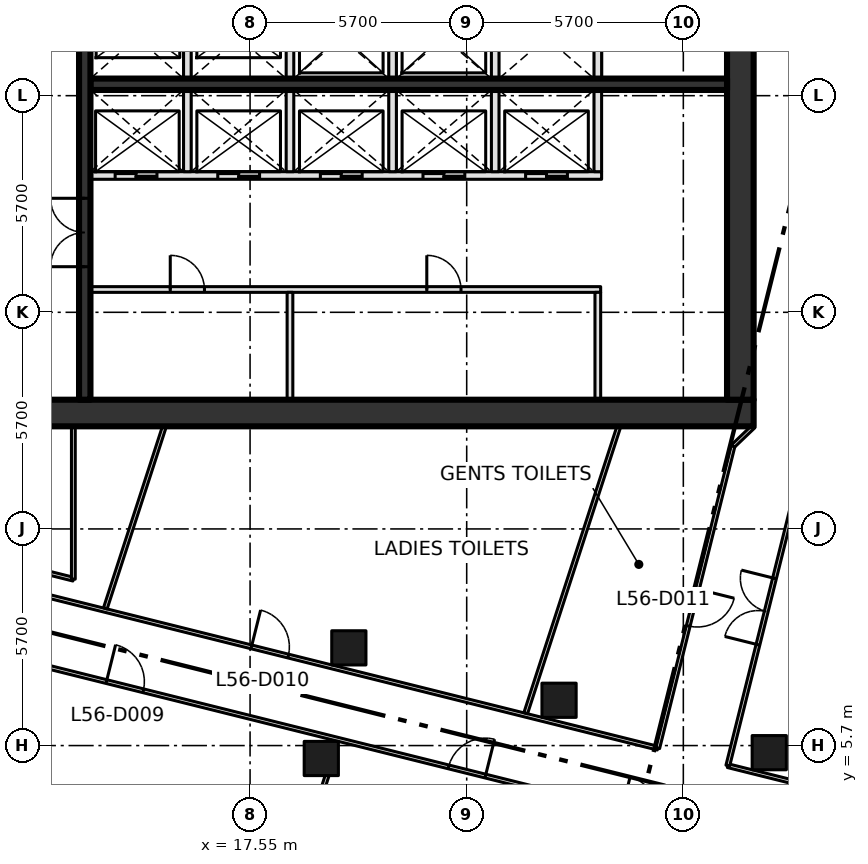
"""IFC4 building model, lengths in metres.
Left out: names, types, materials, properties, quantities, classifications, styles, units other than length and angle.
Written with IfcOpenShell. Run it as: python <this file> out.ifc"""

import sys

from ifc_helpers import new_model, si_unit, direction, frame, frame_2d, origin, origin_2d, place, context, subcontext, project, spatial, rectangle, extrude, element, fill, save


model = new_model("IFC4")
c1 = context("Model", 3, precision=1e-05, world=origin(), true_north=direction((0.0, 1.0)))
c2 = subcontext(c1, "Body", "Model", "MODEL_VIEW")
j1 = project(units=[si_unit("LENGTHUNIT", "METRE"), si_unit("PLANEANGLEUNIT", "RADIAN")], contexts=[c1])
p1 = place(None, origin())
s1 = spatial("IfcSite", under=j1, at=p1, CompositionType="ELEMENT")
p2 = place(p1, origin())
s2 = spatial("IfcBuilding", under=s1, at=p2, CompositionType="ELEMENT")
p3 = place(p2, frame((0.0, 0.0, 246.6)))
s3 = spatial("IfcBuildingStorey", under=s2, at=p3, CompositionType="ELEMENT", Elevation=246.6)
for number, where, z_axis, x_axis in (
    (1, (19.424, 5.36, 0.0), (0.0, 0.0, 1.0), (1.0, 0.0, 0.0)),
    (2, (20.149, 8.271, 0.0), (0.0, 0.0, 1.0), (1.0, 0.0, 0.0)),
    (3, (25.68, 6.892, 0.0), (0.0, 0.0, 1.0), (1.0, 0.0, 0.0)),
    (4, (31.211, 5.513, 0.0), (0.0, 0.0, 1.0), (1.0, 0.0, 0.0)),
):
    element("IfcColumn", number, at=place(p3, frame(where, z_axis=z_axis, x_axis=x_axis)), inside=s3, PredefinedType="COLUMN", context=c2, shape_type="SweptSolid", body=[
        extrude(rectangle(XDim=0.9, YDim=0.9, at=origin_2d()), origin(), (0.0, 0.0, 1.0), 4.2),
    ])
p4 = place(p3, frame((8.0, 14.45, -0.3), z_axis=(0.0, 0.0, 1.0), x_axis=(1.0, 0.0, 0.0)))
e5 = element("IfcWall", 5, at=p4, inside=s3, PredefinedType="SHEAR", context=c2, shape_type="SweptSolid", body=[
    extrude(rectangle(XDim=22.8, YDim=0.7, at=frame_2d((11.4, 0.0))), origin(), (0.0, 0.0, 1.0), 4.2),
])
p5 = place(p4, frame((2.3, 0.0, 0.3)))
e6 = element("IfcOpeningElement", 6, at=p5, cuts=e5, PredefinedType="OPENING", context=c2, shape_type="SweptSolid", body=[
    extrude(rectangle(XDim=1.8, YDim=2.1, at=frame_2d((0.9, 1.05))), frame((0.0, 0.36, 0.0), z_axis=(0.0, -1.0, 0.0), x_axis=(1.0, 0.0, 0.0)), (0.0, 0.0, 1.0), 0.72),
])
p6 = place(p3, frame((30.45, 14.8, -0.3), z_axis=(0.0, 0.0, 1.0), x_axis=(0.0, 1.0, 0.0)))
e7 = element("IfcWall", 7, at=p6, inside=s3, PredefinedType="SHEAR", context=c2, shape_type="SweptSolid", body=[
    extrude(rectangle(XDim=20.9, YDim=0.7, at=frame_2d((10.45, 0.0))), origin(), (0.0, 0.0, 1.0), 4.2),
])
p7 = place(p3, frame((13.35, 17.7, 0.0), z_axis=(0.0, 0.0, 1.0), x_axis=(1.0, 0.0, 0.0)))
e8 = element("IfcWall", 8, at=p7, inside=s3, PredefinedType="PARTITIONING", context=c2, shape_type="SweptSolid", body=[
    extrude(rectangle(XDim=13.425, YDim=0.15, at=frame_2d((6.712, 0.0))), origin(), (0.0, 0.0, 1.0), 3.9),
])
p8 = place(p7, frame((2.1, 0.0, 0.0)))
e9 = element("IfcOpeningElement", 9, at=p8, cuts=e8, PredefinedType="OPENING", context=c2, shape_type="SweptSolid", body=[
    extrude(rectangle(XDim=0.9, YDim=2.1, at=frame_2d((0.45, 1.05))), frame((0.0, 0.085, 0.0), z_axis=(0.0, -1.0, 0.0), x_axis=(1.0, 0.0, 0.0)), (0.0, 0.0, 1.0), 0.17),
])
p9 = place(p7, frame((8.85, 0.0, 0.0)))
e10 = element("IfcOpeningElement", 10, at=p9, cuts=e8, PredefinedType="OPENING", context=c2, shape_type="SweptSolid", body=[
    extrude(rectangle(XDim=0.9, YDim=2.1, at=frame_2d((0.45, 1.05))), frame((0.0, 0.085, 0.0), z_axis=(0.0, -1.0, 0.0), x_axis=(1.0, 0.0, 0.0)), (0.0, 0.0, 1.0), 0.17),
])
p10 = place(p3, frame((13.35, 20.7, 0.0), z_axis=(0.0, 0.0, 1.0), x_axis=(1.0, 0.0, 0.0)))
e11 = element("IfcWall", 11, at=p10, inside=s3, PredefinedType="SOLIDWALL", context=c2, shape_type="SweptSolid", body=[
    extrude(rectangle(XDim=13.45, YDim=0.2, at=frame_2d((6.725, 0.0))), origin(), (0.0, 0.0, 1.0), 3.9),
])
p11 = place(p10, frame((0.65, 0.0, 0.0)))
e12 = element("IfcOpeningElement", 12, at=p11, cuts=e11, PredefinedType="OPENING", context=c2, shape_type="SweptSolid", body=[
    extrude(rectangle(XDim=1.1, YDim=2.1, at=frame_2d((0.55, 1.05))), frame((0.0, 0.11, 0.0), z_axis=(0.0, -1.0, 0.0), x_axis=(1.0, 0.0, 0.0)), (0.0, 0.0, 1.0), 0.22),
])
p12 = place(p10, frame((3.35, 0.0, 0.0)))
e13 = element("IfcOpeningElement", 13, at=p12, cuts=e11, PredefinedType="OPENING", context=c2, shape_type="SweptSolid", body=[
    extrude(rectangle(XDim=1.1, YDim=2.1, at=frame_2d((0.55, 1.05))), frame((0.0, 0.11, 0.0), z_axis=(0.0, -1.0, 0.0), x_axis=(1.0, 0.0, 0.0)), (0.0, 0.0, 1.0), 0.22),
])
p13 = place(p10, frame((6.05, 0.0, 0.0)))
e14 = element("IfcOpeningElement", 14, at=p13, cuts=e11, PredefinedType="OPENING", context=c2, shape_type="SweptSolid", body=[
    extrude(rectangle(XDim=1.1, YDim=2.1, at=frame_2d((0.55, 1.05))), frame((0.0, 0.11, 0.0), z_axis=(0.0, -1.0, 0.0), x_axis=(1.0, 0.0, 0.0)), (0.0, 0.0, 1.0), 0.22),
])
p14 = place(p10, frame((8.75, 0.0, 0.0)))
e15 = element("IfcOpeningElement", 15, at=p14, cuts=e11, PredefinedType="OPENING", context=c2, shape_type="SweptSolid", body=[
    extrude(rectangle(XDim=1.1, YDim=2.1, at=frame_2d((0.55, 1.05))), frame((0.0, 0.11, 0.0), z_axis=(0.0, -1.0, 0.0), x_axis=(1.0, 0.0, 0.0)), (0.0, 0.0, 1.0), 0.22),
])
p15 = place(p10, frame((11.45, 0.0, 0.0)))
e16 = element("IfcOpeningElement", 16, at=p15, cuts=e11, PredefinedType="OPENING", context=c2, shape_type="SweptSolid", body=[
    extrude(rectangle(XDim=1.1, YDim=2.1, at=frame_2d((0.55, 1.05))), frame((0.0, 0.11, 0.0), z_axis=(0.0, -1.0, 0.0), x_axis=(1.0, 0.0, 0.0)), (0.0, 0.0, 1.0), 0.22),
])
p16 = place(p3, frame((13.35, 23.1, 0.0), z_axis=(0.0, 0.0, 1.0), x_axis=(1.0, 0.0, 0.0)))
e17 = element("IfcWall", 17, at=p16, inside=s3, PredefinedType="SHEAR", context=c2, shape_type="SweptSolid", body=[
    extrude(rectangle(XDim=16.75, YDim=0.3, at=frame_2d((8.375, 0.0))), origin(), (0.0, 0.0, 1.0), 3.9),
])
p17 = place(p3, frame((13.2, 14.8, 0.0), z_axis=(0.0, 0.0, 1.0), x_axis=(0.0, 1.0, 0.0)))
e18 = element("IfcWall", 18, at=p17, inside=s3, PredefinedType="SHEAR", context=c2, shape_type="SweptSolid", body=[
    extrude(rectangle(XDim=20.9, YDim=0.3, at=frame_2d((10.45, 0.0))), origin(), (0.0, 0.0, 1.0), 3.9),
])
p18 = place(p17, frame((3.5, 0.0, 0.0)))
e19 = element("IfcOpeningElement", 19, at=p18, cuts=e18, PredefinedType="OPENING", context=c2, shape_type="SweptSolid", body=[
    extrude(rectangle(XDim=1.8, YDim=2.1, at=frame_2d((0.9, 1.05))), frame((0.0, 0.16, 0.0), z_axis=(0.0, -1.0, 0.0), x_axis=(1.0, 0.0, 0.0)), (0.0, 0.0, 1.0), 0.32),
])
p19 = place(p17, frame((11.6, 0.0, 0.0)))
e20 = element("IfcOpeningElement", 20, at=p19, cuts=e18, PredefinedType="OPENING", context=c2, shape_type="SweptSolid", body=[
    extrude(rectangle(XDim=1.2, YDim=2.1, at=frame_2d((0.6, 1.05))), frame((0.0, 0.16, 0.0), z_axis=(0.0, -1.0, 0.0), x_axis=(1.0, 0.0, 0.0)), (0.0, 0.0, 1.0), 0.32),
])
p20 = place(p3, frame((15.9, 20.8, 0.0), z_axis=(0.0, 0.0, 1.0), x_axis=(0.0, 1.0, 0.0)))
e21 = element("IfcWall", 21, at=p20, inside=s3, PredefinedType="SOLIDWALL", context=c2, shape_type="SweptSolid", body=[
    extrude(rectangle(XDim=4.6, YDim=0.2, at=frame_2d((2.3, 0.0))), origin(), (0.0, 0.0, 1.0), 3.9),
])
p21 = place(p3, frame((18.6, 14.8, 0.0), z_axis=(0.0, 0.0, 1.0), x_axis=(0.0, 1.0, 0.0)))
e22 = element("IfcWall", 22, at=p21, inside=s3, PredefinedType="PARTITIONING", context=c2, shape_type="SweptSolid", body=[
    extrude(rectangle(XDim=2.825, YDim=0.15, at=frame_2d((1.413, 0.0))), origin(), (0.0, 0.0, 1.0), 3.9),
])
p22 = place(p3, frame((18.6, 20.8, 0.0), z_axis=(0.0, 0.0, 1.0), x_axis=(0.0, 1.0, 0.0)))
e23 = element("IfcWall", 23, at=p22, inside=s3, PredefinedType="SOLIDWALL", context=c2, shape_type="SweptSolid", body=[
    extrude(rectangle(XDim=7.6, YDim=0.2, at=frame_2d((3.8, 0.0))), origin(), (0.0, 0.0, 1.0), 3.9),
])
p23 = place(p22, frame((5.6, 0.0, 0.0)))
e24 = element("IfcOpeningElement", 24, at=p23, cuts=e23, PredefinedType="OPENING", context=c2, shape_type="SweptSolid", body=[
    extrude(rectangle(XDim=1.2, YDim=2.1, at=frame_2d((0.6, 1.05))), frame((0.0, 0.11, 0.0), z_axis=(0.0, -1.0, 0.0), x_axis=(1.0, 0.0, 0.0)), (0.0, 0.0, 1.0), 0.22),
])
for number, where, z_axis, x_axis in (
    (25, (21.3, 20.8, 0.0), (0.0, 0.0, 1.0), (0.0, 1.0, 0.0)),
    (26, (24.0, 20.8, 0.0), (0.0, 0.0, 1.0), (0.0, 1.0, 0.0)),
):
    element("IfcWall", number, at=place(p3, frame(where, z_axis=z_axis, x_axis=x_axis)), inside=s3, PredefinedType="SOLIDWALL", context=c2, shape_type="SweptSolid", body=[
        extrude(rectangle(XDim=4.6, YDim=0.2, at=frame_2d((2.3, 0.0))), origin(), (0.0, 0.0, 1.0), 3.9),
    ])
p24 = place(p3, frame((26.7, 14.8, 0.0), z_axis=(0.0, 0.0, 1.0), x_axis=(0.0, 1.0, 0.0)))
e27 = element("IfcWall", 27, at=p24, inside=s3, PredefinedType="PARTITIONING", context=c2, shape_type="SweptSolid", body=[
    extrude(rectangle(XDim=2.825, YDim=0.15, at=frame_2d((1.413, 0.0))), origin(), (0.0, 0.0, 1.0), 3.9),
])
p25 = place(p3, frame((26.7, 20.8, 0.0), z_axis=(0.0, 0.0, 1.0), x_axis=(0.0, 1.0, 0.0)))
e28 = element("IfcWall", 28, at=p25, inside=s3, PredefinedType="SOLIDWALL", context=c2, shape_type="SweptSolid", body=[
    extrude(rectangle(XDim=4.6, YDim=0.2, at=frame_2d((2.3, 0.0))), origin(), (0.0, 0.0, 1.0), 3.9),
])
p26 = place(p3, frame((8.55, 8.685, 0.0), z_axis=(0.0, 0.0, 1.0), x_axis=(0.970297603286, -0.241914367199, 0.0)))
e29 = element("IfcWall", 29, at=p26, inside=s3, PredefinedType="PARTITIONING", context=c2, shape_type="SweptSolid", body=[
    extrude(rectangle(XDim=50.675, YDim=0.1, at=frame_2d((25.337, 0.0))), origin(), (0.0, 0.0, 1.0), 3.9),
])
p27 = place(p26, frame((35.657, 0.0, 0.0)))
e30 = element("IfcOpeningElement", 30, at=p27, cuts=e29, PredefinedType="OPENING", context=c2, shape_type="SweptSolid", body=[
    extrude(rectangle(XDim=1.8, YDim=2.1, at=frame_2d((0.9, 1.05))), frame((0.0, 0.06, 0.0), z_axis=(0.0, -1.0, 0.0), x_axis=(1.0, 0.0, 0.0)), (0.0, 0.0, 1.0), 0.12),
])
p28 = place(p26, frame((14.657, 0.0, 0.0)))
e31 = element("IfcOpeningElement", 31, at=p28, cuts=e29, PredefinedType="OPENING", context=c2, shape_type="SweptSolid", body=[
    extrude(rectangle(XDim=1.0, YDim=2.1, at=frame_2d((0.5, 1.05))), frame((0.0, 0.06, 0.0), z_axis=(0.0, -1.0, 0.0), x_axis=(1.0, 0.0, 0.0)), (0.0, 0.0, 1.0), 0.12),
])
p29 = place(p26, frame((19.357, 0.0, 0.0)))
e32 = element("IfcOpeningElement", 32, at=p29, cuts=e29, PredefinedType="OPENING", context=c2, shape_type="SweptSolid", body=[
    extrude(rectangle(XDim=1.8, YDim=2.1, at=frame_2d((0.9, 1.05))), frame((0.0, 0.06, 0.0), z_axis=(0.0, -1.0, 0.0), x_axis=(1.0, 0.0, 0.0)), (0.0, 0.0, 1.0), 0.12),
])
p30 = place(p26, frame((5.38, 0.0, 0.0)))
e33 = element("IfcOpeningElement", 33, at=p30, cuts=e29, PredefinedType="OPENING", context=c2, shape_type="SweptSolid", body=[
    extrude(rectangle(XDim=1.0, YDim=2.1, at=frame_2d((0.5, 1.05))), frame((0.0, 0.06, 0.0), z_axis=(0.0, -1.0, 0.0), x_axis=(1.0, 0.0, 0.0)), (0.0, 0.0, 1.0), 0.12),
])
p31 = place(p3, frame((8.988, 10.44, 0.0), z_axis=(0.0, 0.0, 1.0), x_axis=(0.970301223092, -0.241899848006, 0.0)))
e34 = element("IfcWall", 34, at=p31, inside=s3, PredefinedType="PARTITIONING", context=c2, shape_type="SweptSolid", body=[
    extrude(rectangle(XDim=19.879, YDim=0.1, at=frame_2d((9.94, 0.0))), origin(), (0.0, 0.0, 1.0), 3.9),
])
p32 = place(p31, frame((8.861, 0.0, 0.0)))
e35 = element("IfcOpeningElement", 35, at=p32, cuts=e34, PredefinedType="OPENING", context=c2, shape_type="SweptSolid", body=[
    extrude(rectangle(XDim=1.0, YDim=2.1, at=frame_2d((0.5, 1.05))), frame((0.0, 0.06, 0.0), z_axis=(0.0, -1.0, 0.0), x_axis=(1.0, 0.0, 0.0)), (0.0, 0.0, 1.0), 0.12),
])
p33 = place(p3, frame((9.9, 10.826, 0.0), z_axis=(0.0, 0.0, 1.0), x_axis=(0.970290953223, -0.241941038466, 0.0)))
e36 = element("IfcWall", 36, at=p33, inside=s3, PredefinedType="PARTITIONING", context=c2, shape_type="SweptSolid", body=[
    extrude(rectangle(XDim=3.092, YDim=0.1, at=frame_2d((1.546, 0.0))), origin(), (0.0, 0.0, 1.0), 3.9),
])
p34 = place(p3, frame((12.9, 10.078, 0.0), z_axis=(0.0, 0.0, 1.0), x_axis=(0.0, 1.0, 0.0)))
e37 = element("IfcWall", 37, at=p34, inside=s3, PredefinedType="PARTITIONING", context=c2, shape_type="SweptSolid", body=[
    extrude(rectangle(XDim=4.022, YDim=0.1, at=frame_2d((2.011, 0.0))), origin(), (0.0, 0.0, 1.0), 3.9),
])
p35 = place(p3, frame((30.12, 5.171, 0.0), z_axis=(0.0, 0.0, 1.0), x_axis=(0.970298856921, -0.241909338922, 0.0)))
e38 = element("IfcWall", 38, at=p35, inside=s3, PredefinedType="PARTITIONING", context=c2, shape_type="SweptSolid", body=[
    extrude(rectangle(XDim=28.895, YDim=0.1, at=frame_2d((14.448, 0.0))), origin(), (0.0, 0.0, 1.0), 3.9),
])
p36 = place(p35, frame((8.08, 0.0, 0.0)))
e39 = element("IfcOpeningElement", 39, at=p36, cuts=e38, PredefinedType="OPENING", context=c2, shape_type="SweptSolid", body=[
    extrude(rectangle(XDim=1.0, YDim=2.1, at=frame_2d((0.5, 1.05))), frame((0.0, 0.06, 0.0), z_axis=(0.0, -1.0, 0.0), x_axis=(1.0, 0.0, 0.0)), (0.0, 0.0, 1.0), 0.12),
])
p37 = place(p3, frame((30.12, 5.171, 0.0), z_axis=(0.0, 0.0, 1.0), x_axis=(0.241902913229, 0.970300458915, 0.0)))
e40 = element("IfcWall", 40, at=p37, inside=s3, PredefinedType="PARTITIONING", context=c2, shape_type="SweptSolid", body=[
    extrude(rectangle(XDim=8.172, YDim=0.1, at=frame_2d((4.086, 0.0))), origin(), (0.0, 0.0, 1.0), 3.9),
])
p38 = place(p37, frame((3.28, 0.0, 0.0)))
e41 = element("IfcOpeningElement", 41, at=p38, cuts=e40, PredefinedType="OPENING", context=c2, shape_type="SweptSolid", body=[
    extrude(rectangle(XDim=1.8, YDim=2.1, at=frame_2d((0.9, 1.05))), frame((0.0, 0.06, 0.0), z_axis=(0.0, -1.0, 0.0), x_axis=(1.0, 0.0, 0.0)), (0.0, 0.0, 1.0), 0.12),
])
p39 = place(p3, frame((30.259, 13.583, 0.0), z_axis=(0.0, 0.0, 1.0), x_axis=(-0.241841612879, -0.970315739479, 0.0)))
e42 = element("IfcWall", 42, at=p39, inside=s3, PredefinedType="PARTITIONING", context=c2, shape_type="SweptSolid", body=[
    extrude(rectangle(XDim=8.195, YDim=0.1, at=frame_2d((4.098, 0.0))), origin(), (0.0, 0.0, 1.0), 3.9),
])
p40 = place(p39, frame((3.88, 0.0, 0.0)))
e43 = element("IfcOpeningElement", 43, at=p40, cuts=e42, PredefinedType="OPENING", context=c2, shape_type="SweptSolid", body=[
    extrude(rectangle(XDim=1.0, YDim=2.1, at=frame_2d((0.5, 1.05))), frame((0.0, 0.06, 0.0), z_axis=(0.0, -1.0, 0.0), x_axis=(1.0, 0.0, 0.0)), (0.0, 0.0, 1.0), 0.12),
])
p41 = place(p3, frame((30.8, 14.1, 0.0), z_axis=(0.0, 0.0, 1.0), x_axis=(-0.722911025189, -0.690941133281, 0.0)))
e44 = element("IfcWall", 44, at=p41, inside=s3, PredefinedType="PARTITIONING", context=c2, shape_type="SweptSolid", body=[
    extrude(rectangle(XDim=0.748, YDim=0.1, at=frame_2d((0.374, 0.0))), origin(), (0.0, 0.0, 1.0), 3.9),
])
p42 = place(p3, frame((13.741, 9.31, 0.0), z_axis=(0.0, 0.0, 1.0), x_axis=(0.308976461467, 0.95106968528, 0.0)))
e45 = element("IfcWall", 45, at=p42, inside=s3, PredefinedType="PARTITIONING", context=c2, shape_type="SweptSolid", body=[
    extrude(rectangle(XDim=5.036, YDim=0.1, at=frame_2d((2.518, 0.0))), origin(), (0.0, 0.0, 1.0), 3.9),
])
p43 = place(p3, frame((16.946, -3.188, 0.0), z_axis=(0.0, 0.0, 1.0), x_axis=(0.308984279279, 0.951067145452, 0.0)))
e46 = element("IfcWall", 46, at=p43, inside=s3, PredefinedType="PARTITIONING", context=c2, shape_type="SweptSolid", body=[
    extrude(rectangle(XDim=8.515, YDim=0.1, at=frame_2d((4.257, 0.0))), origin(), (0.0, 0.0, 1.0), 3.9),
])
p44 = place(p3, frame((24.803, 6.552, 0.0), z_axis=(0.0, 0.0, 1.0), x_axis=(0.308946255954, 0.951079497693, 0.0)))
e47 = element("IfcWall", 47, at=p44, inside=s3, PredefinedType="PARTITIONING", context=c2, shape_type="SweptSolid", body=[
    extrude(rectangle(XDim=7.936, YDim=0.1, at=frame_2d((3.968, 0.0))), origin(), (0.0, 0.0, 1.0), 3.9),
])
p45 = place(p11, origin())
e48 = element("IfcDoor", 48, at=p45, inside=s3, OperationType="SLIDING_TO_LEFT", PredefinedType="DOOR", context=c2, shape_type="SweptSolid", body=[
    extrude(rectangle(XDim=1.1, YDim=2.1, at=frame_2d((0.55, 1.05))), frame((0.0, 0.025, 0.0), z_axis=(0.0, -1.0, 0.0), x_axis=(1.0, 0.0, 0.0)), (0.0, 0.0, 1.0), 0.05),
])
fill(e12, e48)
p46 = place(p12, origin())
e49 = element("IfcDoor", 49, at=p46, inside=s3, OperationType="SLIDING_TO_LEFT", PredefinedType="DOOR", context=c2, shape_type="SweptSolid", body=[
    extrude(rectangle(XDim=1.1, YDim=2.1, at=frame_2d((0.55, 1.05))), frame((0.0, 0.025, 0.0), z_axis=(0.0, -1.0, 0.0), x_axis=(1.0, 0.0, 0.0)), (0.0, 0.0, 1.0), 0.05),
])
fill(e13, e49)
p47 = place(p13, origin())
e50 = element("IfcDoor", 50, at=p47, inside=s3, OperationType="SLIDING_TO_LEFT", PredefinedType="DOOR", context=c2, shape_type="SweptSolid", body=[
    extrude(rectangle(XDim=1.1, YDim=2.1, at=frame_2d((0.55, 1.05))), frame((0.0, 0.025, 0.0), z_axis=(0.0, -1.0, 0.0), x_axis=(1.0, 0.0, 0.0)), (0.0, 0.0, 1.0), 0.05),
])
fill(e14, e50)
p48 = place(p14, origin())
e51 = element("IfcDoor", 51, at=p48, inside=s3, OperationType="SLIDING_TO_LEFT", PredefinedType="DOOR", context=c2, shape_type="SweptSolid", body=[
    extrude(rectangle(XDim=1.1, YDim=2.1, at=frame_2d((0.55, 1.05))), frame((0.0, 0.025, 0.0), z_axis=(0.0, -1.0, 0.0), x_axis=(1.0, 0.0, 0.0)), (0.0, 0.0, 1.0), 0.05),
])
fill(e15, e51)
p49 = place(p15, origin())
e52 = element("IfcDoor", 52, at=p49, inside=s3, OperationType="SLIDING_TO_LEFT", PredefinedType="DOOR", context=c2, shape_type="SweptSolid", body=[
    extrude(rectangle(XDim=1.1, YDim=2.1, at=frame_2d((0.55, 1.05))), frame((0.0, 0.025, 0.0), z_axis=(0.0, -1.0, 0.0), x_axis=(1.0, 0.0, 0.0)), (0.0, 0.0, 1.0), 0.05),
])
fill(e16, e52)
p50 = place(p8, origin())
e53 = element("IfcDoor", 53, at=p50, inside=s3, OperationType="SINGLE_SWING_LEFT", PredefinedType="DOOR", context=c2, shape_type="SweptSolid", body=[
    extrude(rectangle(XDim=0.9, YDim=2.1, at=frame_2d((0.45, 1.05))), frame((0.0, 0.025, 0.0), z_axis=(0.0, -1.0, 0.0), x_axis=(1.0, 0.0, 0.0)), (0.0, 0.0, 1.0), 0.05),
])
fill(e9, e53)
p51 = place(p9, origin())
e54 = element("IfcDoor", 54, at=p51, inside=s3, OperationType="SINGLE_SWING_LEFT", PredefinedType="DOOR", context=c2, shape_type="SweptSolid", body=[
    extrude(rectangle(XDim=0.9, YDim=2.1, at=frame_2d((0.45, 1.05))), frame((0.0, 0.025, 0.0), z_axis=(0.0, -1.0, 0.0), x_axis=(1.0, 0.0, 0.0)), (0.0, 0.0, 1.0), 0.05),
])
fill(e10, e54)
p52 = place(p18, origin())
e55 = element("IfcDoor", 55, at=p52, inside=s3, OperationType="DOUBLE_DOOR_SINGLE_SWING", PredefinedType="DOOR", context=c2, shape_type="SweptSolid", body=[
    extrude(rectangle(XDim=1.8, YDim=2.1, at=frame_2d((0.9, 1.05))), frame((0.0, 0.025, 0.0), z_axis=(0.0, -1.0, 0.0), x_axis=(1.0, 0.0, 0.0)), (0.0, 0.0, 1.0), 0.05),
])
fill(e19, e55)
p53 = place(p28, origin())
e56 = element("IfcDoor", 56, at=p53, inside=s3, OperationType="SINGLE_SWING_RIGHT", PredefinedType="DOOR", context=c2, shape_type="SweptSolid", body=[
    extrude(rectangle(XDim=1.0, YDim=2.1, at=frame_2d((0.5, 1.05))), frame((0.0, 0.025, 0.0), z_axis=(0.0, -1.0, 0.0), x_axis=(1.0, 0.0, 0.0)), (0.0, 0.0, 1.0), 0.05),
])
fill(e31, e56)
p54 = place(p30, origin())
e57 = element("IfcDoor", 57, at=p54, inside=s3, OperationType="SINGLE_SWING_LEFT", PredefinedType="DOOR", context=c2, shape_type="SweptSolid", body=[
    extrude(rectangle(XDim=1.0, YDim=2.1, at=frame_2d((0.5, 1.05))), frame((0.0, 0.025, 0.0), z_axis=(0.0, -1.0, 0.0), x_axis=(1.0, 0.0, 0.0)), (0.0, 0.0, 1.0), 0.05),
])
fill(e33, e57)
p55 = place(p32, origin())
e58 = element("IfcDoor", 58, at=p55, inside=s3, OperationType="SINGLE_SWING_LEFT", PredefinedType="DOOR", context=c2, shape_type="SweptSolid", body=[
    extrude(rectangle(XDim=1.0, YDim=2.1, at=frame_2d((0.5, 1.05))), frame((0.0, 0.025, 0.0), z_axis=(0.0, -1.0, 0.0), x_axis=(1.0, 0.0, 0.0)), (0.0, 0.0, 1.0), 0.05),
])
fill(e35, e58)
p56 = place(p40, origin())
e59 = element("IfcDoor", 59, at=p56, inside=s3, OperationType="SINGLE_SWING_LEFT", PredefinedType="DOOR", context=c2, shape_type="SweptSolid", body=[
    extrude(rectangle(XDim=1.0, YDim=2.1, at=frame_2d((0.5, 1.05))), frame((0.0, 0.025, 0.0), z_axis=(0.0, -1.0, 0.0), x_axis=(1.0, 0.0, 0.0)), (0.0, 0.0, 1.0), 0.05),
])
fill(e43, e59)
p57 = place(p38, origin())
e60 = element("IfcDoor", 60, at=p57, inside=s3, OperationType="DOUBLE_DOOR_SINGLE_SWING", PredefinedType="DOOR", context=c2, shape_type="SweptSolid", body=[
    extrude(rectangle(XDim=1.8, YDim=2.1, at=frame_2d((0.9, 1.05))), frame((0.0, 0.025, 0.0), z_axis=(0.0, -1.0, 0.0), x_axis=(1.0, 0.0, 0.0)), (0.0, 0.0, 1.0), 0.05),
])
fill(e41, e60)
save(model, sys.argv[1])
